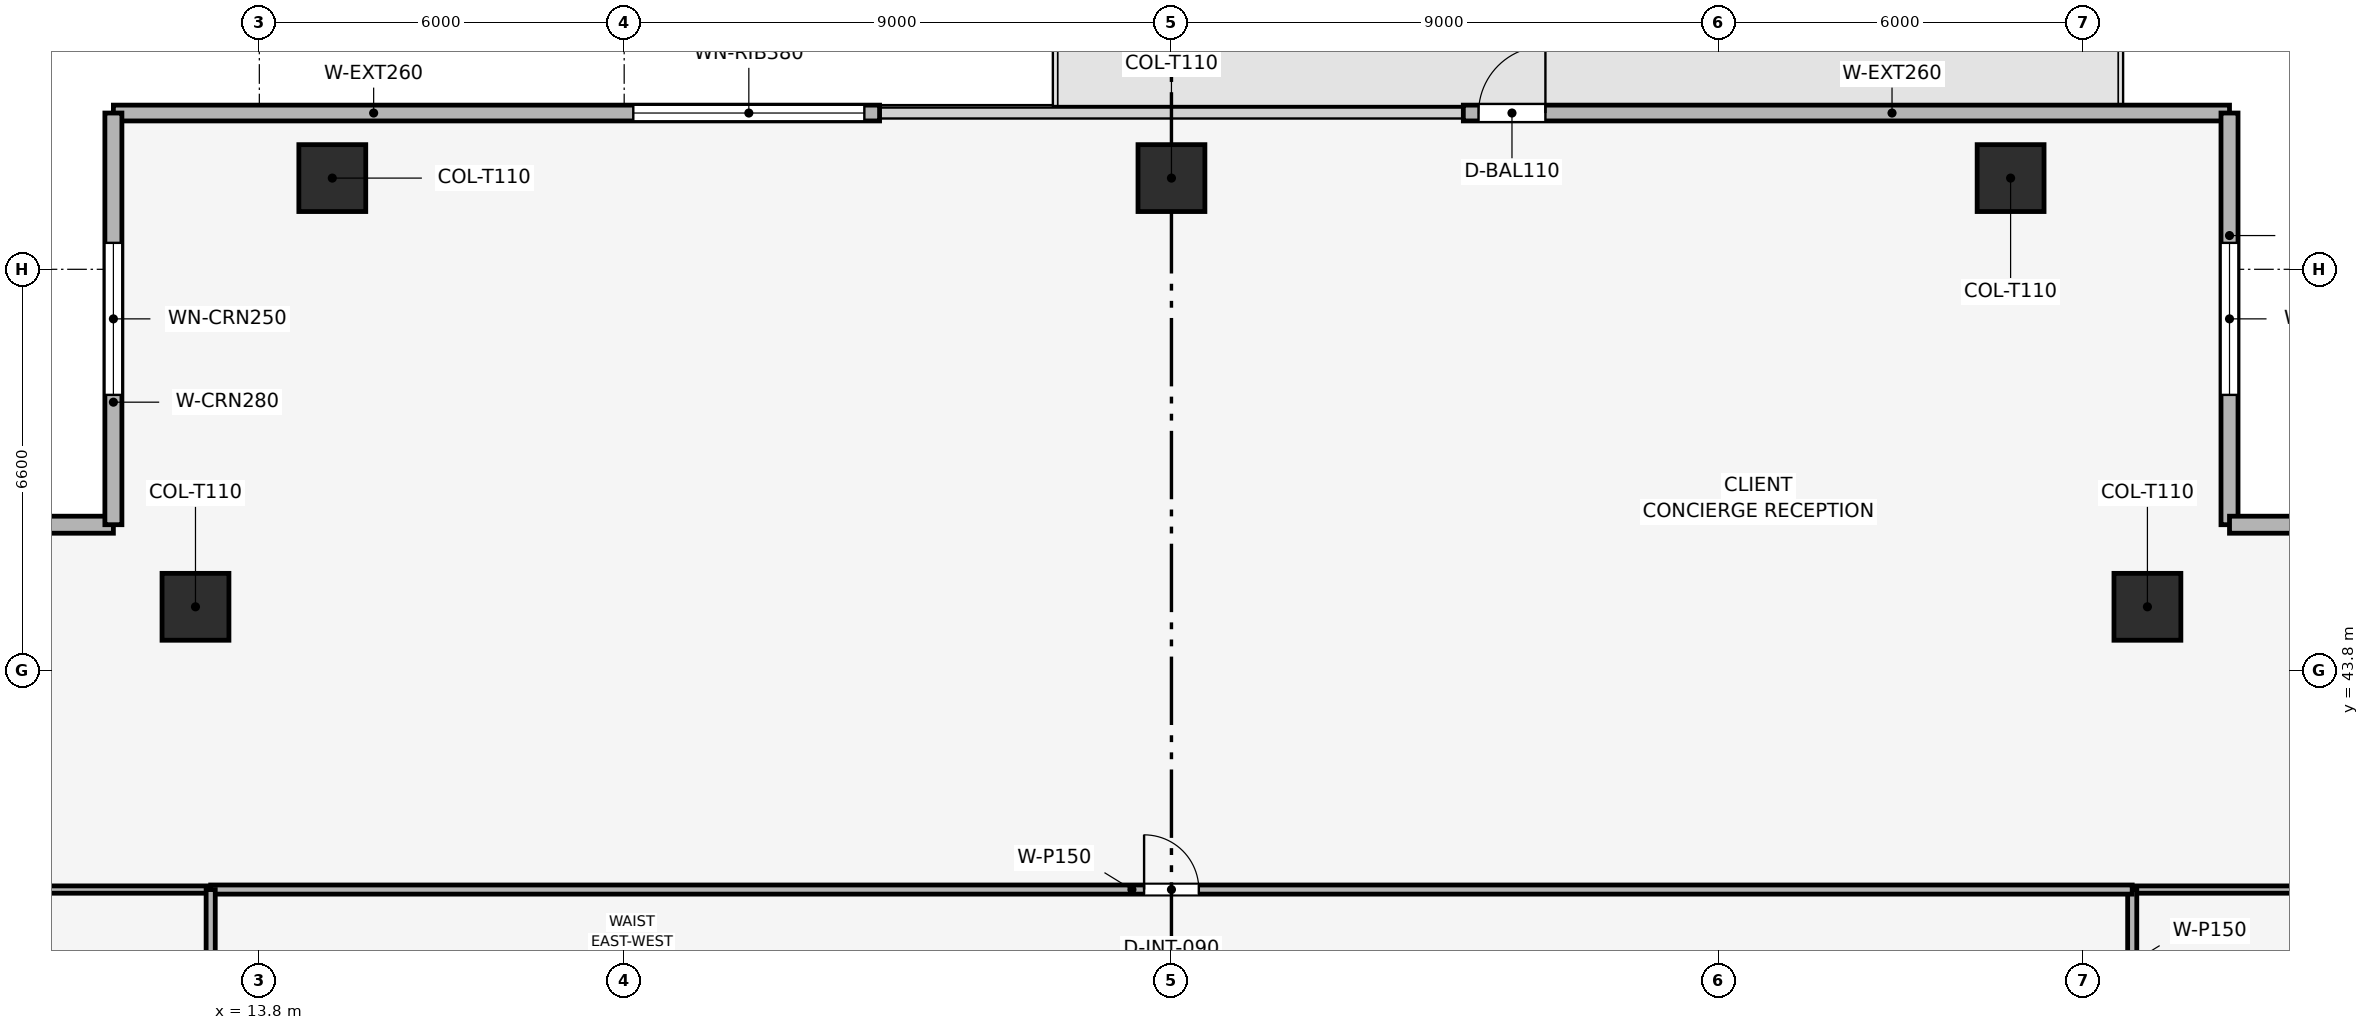
"""IFC4 building model, lengths in metres.
Left out: names, types, materials, properties, quantities, classifications, styles, units other than length and angle.
Written with IfcOpenShell. Run it as: python <this file> out.ifc"""

import sys

from ifc_helpers import new_model, si_unit, direction, frame, frame_2d, origin, origin_2d, place, context, subcontext, project, spatial, rectangle, extrude, element, fill, save


model = new_model("IFC4")
c1 = context("Model", 3, precision=1e-05, world=origin(), true_north=direction((0.0, 1.0)))
c2 = subcontext(c1, "Body", "Model", "MODEL_VIEW")
j1 = project(units=[si_unit("LENGTHUNIT", "METRE"), si_unit("PLANEANGLEUNIT", "RADIAN")], contexts=[c1])
p1 = place(None, origin())
s1 = spatial("IfcSite", under=j1, at=p1, CompositionType="ELEMENT")
p2 = place(p1, origin())
s2 = spatial("IfcBuilding", under=s1, at=p2, CompositionType="ELEMENT")
p3 = place(p2, frame((0.0, 0.0, 160.8)))
s3 = spatial("IfcBuildingStorey", under=s2, at=p3, CompositionType="ELEMENT", Elevation=160.8)
for number, where, z_axis, x_axis in (
    (1, (42.6, 51.9, 0.003), (0.0, 0.0, 1.0), (1.0, 0.0, 0.0)),
    (2, (28.8, 51.9, 0.003), (0.0, 0.0, 1.0), (1.0, 0.0, 0.0)),
    (3, (15.0, 51.9, 0.003), (0.0, 0.0, 1.0), (1.0, 0.0, 0.0)),
    (4, (44.85, 44.85, 0.003), (0.0, 0.0, 1.0), (1.0, 0.0, 0.0)),
    (5, (12.75, 44.85, 0.003), (0.0, 0.0, 1.0), (1.0, 0.0, 0.0)),
):
    element("IfcColumn", number, at=place(p3, frame(where, z_axis=z_axis, x_axis=x_axis)), inside=s3, PredefinedType="COLUMN", context=c2, shape_type="SweptSolid", body=[
        extrude(rectangle(XDim=1.1, YDim=1.1, at=origin_2d()), origin(), (0.0, 0.0, 1.0), 3.489),
    ])
p4 = place(p3, frame((11.4, 52.97, 0.0), z_axis=(0.0, 0.0, 1.0), x_axis=(1.0, 0.0, 0.0)))
e6 = element("IfcWall", 6, at=p4, inside=s3, PredefinedType="SOLIDWALL", context=c2, shape_type="SweptSolid", body=[
    extrude(rectangle(XDim=12.6, YDim=0.26, at=frame_2d((6.3, 0.0))), origin(), (0.0, 0.0, 1.0), 3.495),
])
p5 = place(p4, frame((8.55, 0.0, 0.9)))
e7 = element("IfcOpeningElement", 7, at=p5, cuts=e6, PredefinedType="OPENING", context=c2, shape_type="SweptSolid", body=[
    extrude(rectangle(XDim=3.8, YDim=1.9, at=frame_2d((1.9, 0.95))), frame((0.0, 0.14, 0.0), z_axis=(0.0, -1.0, 0.0), x_axis=(1.0, 0.0, 0.0)), (0.0, 0.0, 1.0), 0.28),
])
p6 = place(p3, frame((33.6, 52.97, 0.0), z_axis=(0.0, 0.0, 1.0), x_axis=(1.0, 0.0, 0.0)))
e8 = element("IfcWall", 8, at=p6, inside=s3, PredefinedType="SOLIDWALL", context=c2, shape_type="SweptSolid", body=[
    extrude(rectangle(XDim=12.6, YDim=0.26, at=frame_2d((6.3, 0.0))), origin(), (0.0, 0.0, 1.0), 3.495),
])
p7 = place(p6, frame((0.25, 0.0, 0.0)))
e9 = element("IfcOpeningElement", 9, at=p7, cuts=e8, PredefinedType="OPENING", context=c2, shape_type="SweptSolid", body=[
    extrude(rectangle(XDim=1.1, YDim=2.2, at=frame_2d((0.55, 1.1))), frame((0.0, 0.14, 0.0), z_axis=(0.0, -1.0, 0.0), x_axis=(1.0, 0.0, 0.0)), (0.0, 0.0, 1.0), 0.28),
])
p8 = place(p3, frame((4.63, 46.2, 0.0), z_axis=(0.0, 0.0, 1.0), x_axis=(1.0, 0.0, 0.0)))
e10 = element("IfcWall", 10, at=p8, inside=s3, PredefinedType="SOLIDWALL", context=c2, shape_type="SweptSolid", body=[
    extrude(rectangle(XDim=6.77, YDim=0.28, at=frame_2d((3.385, 0.0))), origin(), (0.0, 0.0, 1.0), 3.495),
])
p9 = place(p8, frame((2.135, 0.0, 0.9)))
e11 = element("IfcOpeningElement", 11, at=p9, cuts=e10, PredefinedType="OPENING", context=c2, shape_type="SweptSolid", body=[
    extrude(rectangle(XDim=2.5, YDim=1.9, at=frame_2d((1.25, 0.95))), frame((0.0, 0.15, 0.0), z_axis=(0.0, -1.0, 0.0), x_axis=(1.0, 0.0, 0.0)), (0.0, 0.0, 1.0), 0.3),
])
p10 = place(p3, frame((11.4, 46.2, 0.0), z_axis=(0.0, 0.0, 1.0), x_axis=(0.0, 1.0, 0.0)))
e12 = element("IfcWall", 12, at=p10, inside=s3, PredefinedType="SOLIDWALL", context=c2, shape_type="SweptSolid", body=[
    extrude(rectangle(XDim=6.77, YDim=0.28, at=frame_2d((3.385, 0.0))), origin(), (0.0, 0.0, 1.0), 3.495),
])
p11 = place(p10, frame((2.135, 0.0, 0.9)))
e13 = element("IfcOpeningElement", 13, at=p11, cuts=e12, PredefinedType="OPENING", context=c2, shape_type="SweptSolid", body=[
    extrude(rectangle(XDim=2.5, YDim=1.9, at=frame_2d((1.25, 0.95))), frame((0.0, 0.15, 0.0), z_axis=(0.0, -1.0, 0.0), x_axis=(1.0, 0.0, 0.0)), (0.0, 0.0, 1.0), 0.3),
])
p12 = place(p3, frame((46.2, 52.97, 0.0), z_axis=(0.0, 0.0, 1.0), x_axis=(0.0, -1.0, 0.0)))
e14 = element("IfcWall", 14, at=p12, inside=s3, PredefinedType="SOLIDWALL", context=c2, shape_type="SweptSolid", body=[
    extrude(rectangle(XDim=6.77, YDim=0.28, at=frame_2d((3.385, 0.0))), origin(), (0.0, 0.0, 1.0), 3.495),
])
p13 = place(p12, frame((2.135, 0.0, 0.9)))
e15 = element("IfcOpeningElement", 15, at=p13, cuts=e14, PredefinedType="OPENING", context=c2, shape_type="SweptSolid", body=[
    extrude(rectangle(XDim=2.5, YDim=1.9, at=frame_2d((1.25, 0.95))), frame((0.0, 0.15, 0.0), z_axis=(0.0, -1.0, 0.0), x_axis=(1.0, 0.0, 0.0)), (0.0, 0.0, 1.0), 0.3),
])
p14 = place(p3, frame((46.2, 46.2, 0.0), z_axis=(0.0, 0.0, 1.0), x_axis=(1.0, 0.0, 0.0)))
e16 = element("IfcWall", 16, at=p14, inside=s3, PredefinedType="SOLIDWALL", context=c2, shape_type="SweptSolid", body=[
    extrude(rectangle(XDim=6.77, YDim=0.28, at=frame_2d((3.385, 0.0))), origin(), (0.0, 0.0, 1.0), 3.495),
])
p15 = place(p14, frame((2.135, 0.0, 0.9)))
e17 = element("IfcOpeningElement", 17, at=p15, cuts=e16, PredefinedType="OPENING", context=c2, shape_type="SweptSolid", body=[
    extrude(rectangle(XDim=2.5, YDim=1.9, at=frame_2d((1.25, 0.95))), frame((0.0, 0.15, 0.0), z_axis=(0.0, -1.0, 0.0), x_axis=(1.0, 0.0, 0.0)), (0.0, 0.0, 1.0), 0.3),
])
p16 = place(p3, frame((4.63, 40.2, 0.0), z_axis=(0.0, 0.0, 1.0), x_axis=(1.0, 0.0, 0.0)))
e18 = element("IfcWall", 18, at=p16, inside=s3, PredefinedType="PARTITIONING", context=c2, shape_type="SweptSolid", body=[
    extrude(rectangle(XDim=8.37, YDim=0.12, at=frame_2d((4.185, 0.0))), origin(), (0.0, 0.0, 1.0), 2.98),
])
p17 = place(p3, frame((44.6, 40.2, 0.0), z_axis=(0.0, 0.0, 1.0), x_axis=(1.0, 0.0, 0.0)))
e19 = element("IfcWall", 19, at=p17, inside=s3, PredefinedType="PARTITIONING", context=c2, shape_type="SweptSolid", body=[
    extrude(rectangle(XDim=8.37, YDim=0.12, at=frame_2d((4.185, 0.0))), origin(), (0.0, 0.0, 1.0), 2.98),
])
p18 = place(p3, frame((44.6, 37.8, 0.0), z_axis=(0.0, 0.0, 1.0), x_axis=(0.0, 1.0, 0.0)))
e20 = element("IfcWall", 20, at=p18, inside=s3, PredefinedType="PARTITIONING", context=c2, shape_type="SweptSolid", body=[
    extrude(rectangle(XDim=2.4, YDim=0.15, at=frame_2d((1.2, 0.0))), origin(), (0.0, 0.0, 1.0), 3.495),
])
p19 = place(p3, frame((13.0, 40.2, 0.0), z_axis=(0.0, 0.0, 1.0), x_axis=(1.0, 0.0, 0.0)))
e21 = element("IfcWall", 21, at=p19, inside=s3, PredefinedType="PARTITIONING", context=c2, shape_type="SweptSolid", body=[
    extrude(rectangle(XDim=31.6, YDim=0.15, at=frame_2d((15.8, 0.0))), origin(), (0.0, 0.0, 1.0), 3.03),
])
p20 = place(p19, frame((15.35, 0.0, 0.0)))
e22 = element("IfcOpeningElement", 22, at=p20, cuts=e21, PredefinedType="OPENING", context=c2, shape_type="SweptSolid", body=[
    extrude(rectangle(XDim=0.9, YDim=2.1, at=frame_2d((0.45, 1.05))), frame((0.0, 0.085, 0.0), z_axis=(0.0, -1.0, 0.0), x_axis=(1.0, 0.0, 0.0)), (0.0, 0.0, 1.0), 0.17),
])
p21 = place(p3, frame((13.0, 17.4, 0.0), z_axis=(0.0, 0.0, 1.0), x_axis=(0.0, 1.0, 0.0)))
e23 = element("IfcWall", 23, at=p21, inside=s3, PredefinedType="PARTITIONING", context=c2, shape_type="SweptSolid", body=[
    extrude(rectangle(XDim=22.8, YDim=0.15, at=frame_2d((11.4, 0.0))), origin(), (0.0, 0.0, 1.0), 3.03),
])
p22 = place(p21, frame((3.113, 0.0, 0.0)))
e24 = element("IfcOpeningElement", 24, at=p22, cuts=e23, PredefinedType="OPENING", context=c2, shape_type="SweptSolid", body=[
    extrude(rectangle(XDim=0.9, YDim=2.1, at=frame_2d((0.45, 1.05))), frame((0.0, 0.085, 0.0), z_axis=(0.0, -1.0, 0.0), x_axis=(1.0, 0.0, 0.0)), (0.0, 0.0, 1.0), 0.17),
])
p23 = place(p21, frame((7.542, 0.0, 0.0)))
e25 = element("IfcOpeningElement", 25, at=p23, cuts=e23, PredefinedType="OPENING", context=c2, shape_type="SweptSolid", body=[
    extrude(rectangle(XDim=0.9, YDim=2.1, at=frame_2d((0.45, 1.05))), frame((0.0, 0.085, 0.0), z_axis=(0.0, -1.0, 0.0), x_axis=(1.0, 0.0, 0.0)), (0.0, 0.0, 1.0), 0.17),
])
p24 = place(p21, frame((15.378, 0.0, 0.0)))
e26 = element("IfcOpeningElement", 26, at=p24, cuts=e23, PredefinedType="OPENING", context=c2, shape_type="SweptSolid", body=[
    extrude(rectangle(XDim=0.9, YDim=2.1, at=frame_2d((0.45, 1.05))), frame((0.0, 0.085, 0.0), z_axis=(0.0, -1.0, 0.0), x_axis=(1.0, 0.0, 0.0)), (0.0, 0.0, 1.0), 0.17),
])
p25 = place(p7, origin())
e27 = element("IfcDoor", 27, at=p25, inside=s3, OperationType="SINGLE_SWING_RIGHT", PredefinedType="DOOR", context=c2, shape_type="SweptSolid", body=[
    extrude(rectangle(XDim=1.1, YDim=2.2, at=frame_2d((0.55, 1.1))), frame((0.0, 0.025, 0.0), z_axis=(0.0, -1.0, 0.0), x_axis=(1.0, 0.0, 0.0)), (0.0, 0.0, 1.0), 0.05),
])
fill(e9, e27)
p26 = place(p5, origin())
e28 = element("IfcWindow", 28, at=p26, inside=s3, PartitioningType="SINGLE_PANEL", PredefinedType="WINDOW", context=c2, shape_type="SweptSolid", body=[
    extrude(rectangle(XDim=3.8, YDim=1.9, at=frame_2d((1.9, 0.95))), frame((0.0, 0.03, 0.0), z_axis=(0.0, -1.0, 0.0), x_axis=(1.0, 0.0, 0.0)), (0.0, 0.0, 1.0), 0.06),
])
fill(e7, e28)
p27 = place(p11, origin())
e29 = element("IfcWindow", 29, at=p27, inside=s3, PartitioningType="SINGLE_PANEL", PredefinedType="WINDOW", context=c2, shape_type="SweptSolid", body=[
    extrude(rectangle(XDim=2.5, YDim=1.9, at=frame_2d((1.25, 0.95))), frame((0.0, 0.03, 0.0), z_axis=(0.0, -1.0, 0.0), x_axis=(1.0, 0.0, 0.0)), (0.0, 0.0, 1.0), 0.06),
])
fill(e13, e29)
p28 = place(p13, origin())
e30 = element("IfcWindow", 30, at=p28, inside=s3, PartitioningType="SINGLE_PANEL", PredefinedType="WINDOW", context=c2, shape_type="SweptSolid", body=[
    extrude(rectangle(XDim=2.5, YDim=1.9, at=frame_2d((1.25, 0.95))), frame((0.0, 0.03, 0.0), z_axis=(0.0, -1.0, 0.0), x_axis=(1.0, 0.0, 0.0)), (0.0, 0.0, 1.0), 0.06),
])
fill(e15, e30)
p29 = place(p20, origin())
e31 = element("IfcDoor", 31, at=p29, inside=s3, OperationType="SINGLE_SWING_LEFT", PredefinedType="DOOR", context=c2, shape_type="SweptSolid", body=[
    extrude(rectangle(XDim=0.9, YDim=2.1, at=frame_2d((0.45, 1.05))), frame((0.0, 0.025, 0.0), z_axis=(0.0, -1.0, 0.0), x_axis=(1.0, 0.0, 0.0)), (0.0, 0.0, 1.0), 0.05),
])
fill(e22, e31)
save(model, sys.argv[1])
